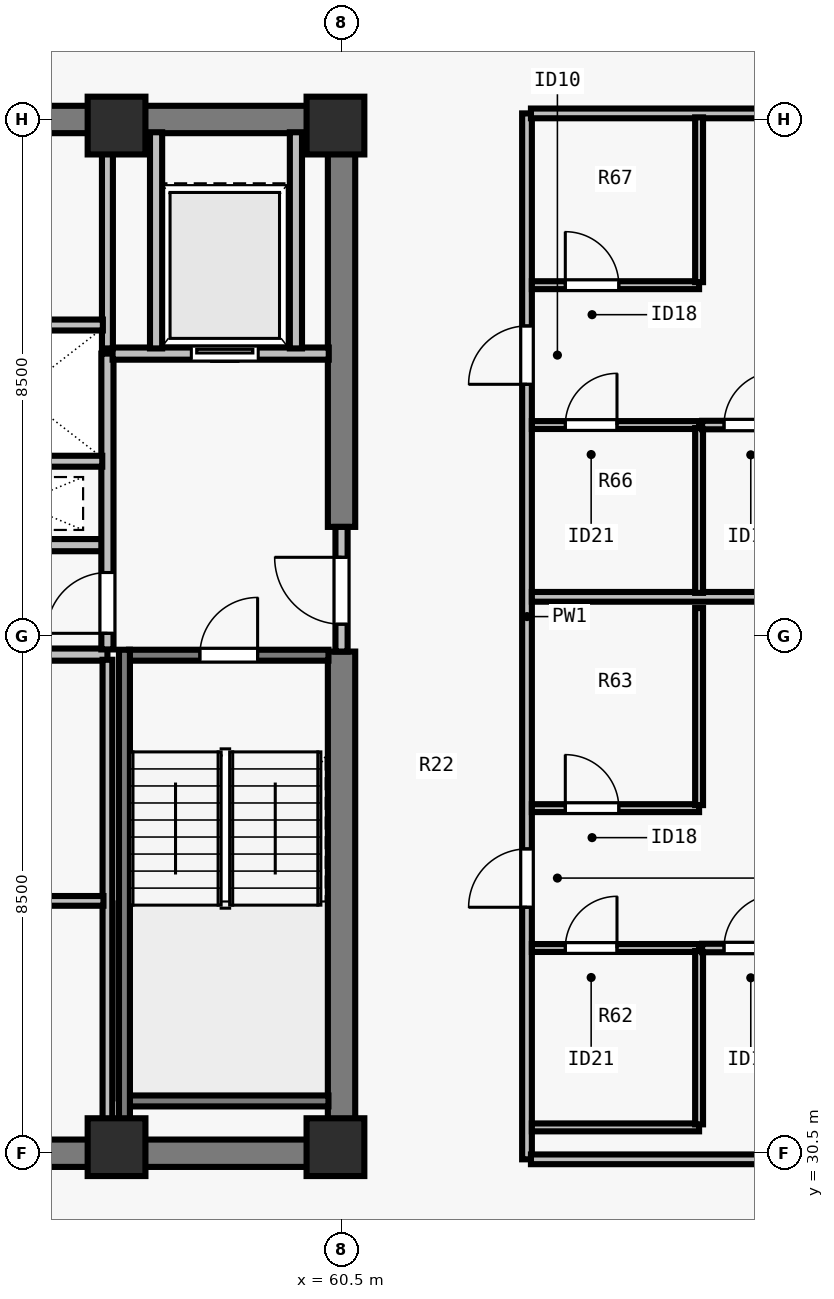
"""IFC4 building model, lengths in metres.
Left out: names, types, materials, properties, quantities, classifications, styles, units other than length and angle.
Written with IfcOpenShell. Run it as: python <this file> out.ifc"""

import sys

from ifc_helpers import new_model, si_unit, direction, frame, frame_2d, origin, origin_2d, place, context, subcontext, project, spatial, rectangle, extrude, element, fill, save


model = new_model("IFC4")
c1 = context("Model", 3, precision=1e-05, world=origin(), true_north=direction((0.0, 1.0)))
c2 = subcontext(c1, "Body", "Model", "MODEL_VIEW")
j1 = project(units=[si_unit("LENGTHUNIT", "METRE"), si_unit("PLANEANGLEUNIT", "RADIAN")], contexts=[c1])
p1 = place(None, origin())
s1 = spatial("IfcSite", under=j1, at=p1, CompositionType="ELEMENT")
p2 = place(p1, origin())
s2 = spatial("IfcBuilding", under=s1, at=p2, CompositionType="ELEMENT")
p3 = place(p2, frame((0.0, 0.0, 262.0)))
s3 = spatial("IfcBuildingStorey", under=s2, at=p3, CompositionType="ELEMENT", Elevation=262.0)
for number, where, z_axis, x_axis in (
    (1, (56.8, 30.6, 0.0), (0.0, 0.0, 1.0), (1.0, 0.0, 0.0)),
    (2, (60.4, 30.6, 0.0), (0.0, 0.0, 1.0), (1.0, 0.0, 0.0)),
    (3, (56.8, 47.4, 0.0), (0.0, 0.0, 1.0), (1.0, 0.0, 0.0)),
    (4, (60.4, 47.4, 0.0), (0.0, 0.0, 1.0), (1.0, 0.0, 0.0)),
):
    element("IfcColumn", number, at=place(p3, frame(where, z_axis=z_axis, x_axis=x_axis)), inside=s3, PredefinedType="COLUMN", context=c2, shape_type="SweptSolid", body=[
        extrude(rectangle(XDim=0.95, YDim=0.95, at=origin_2d()), origin(), (0.0, 0.0, 1.0), 3.5),
    ])
for number, where, z_axis, x_axis in (
    (5, (43.275, 30.5, 0.0), (0.0, 0.0, 1.0), (1.0, 0.0, 0.0)),
    (6, (43.275, 47.5, 0.0), (0.0, 0.0, 1.0), (1.0, 0.0, 0.0)),
):
    element("IfcWall", number, at=place(p3, frame(where, z_axis=z_axis, x_axis=x_axis)), inside=s3, PredefinedType="SHEAR", context=c2, shape_type="SweptSolid", body=[
        extrude(rectangle(XDim=17.45, YDim=0.45, at=frame_2d((8.725, 0.0))), origin(), (0.0, 0.0, 1.0), 3.29),
    ])
p4 = place(p3, frame((60.5, 30.715, 0.0), z_axis=(0.0, 0.0, 1.0), x_axis=(0.0, 1.0, 0.0)))
e7 = element("IfcWall", 7, at=p4, inside=s3, PredefinedType="SHEAR", context=c2, shape_type="SweptSolid", body=[
    extrude(rectangle(XDim=8.035, YDim=0.45, at=frame_2d((4.018, 0.0))), origin(), (0.0, 0.0, 1.0), 3.29),
])
p5 = place(p3, frame((60.5, 40.8, 0.0), z_axis=(0.0, 0.0, 1.0), x_axis=(0.0, 1.0, 0.0)))
e8 = element("IfcWall", 8, at=p5, inside=s3, PredefinedType="SHEAR", context=c2, shape_type="SweptSolid", body=[
    extrude(rectangle(XDim=6.485, YDim=0.45, at=frame_2d((3.242, 0.0))), origin(), (0.0, 0.0, 1.0), 3.29),
])
for number, where, z_axis, x_axis in (
    (9, (53.7, 38.7, 0.0), (0.0, 0.0, 1.0), (1.0, 0.0, 0.0)),
    (10, (53.7, 40.5, 0.0), (0.0, 0.0, 1.0), (1.0, 0.0, 0.0)),
):
    element("IfcWall", number, at=place(p3, frame(where, z_axis=z_axis, x_axis=x_axis)), inside=s3, PredefinedType="SOLIDWALL", context=c2, shape_type="SweptSolid", body=[
        extrude(rectangle(XDim=2.95, YDim=0.2, at=frame_2d((1.475, 0.0))), origin(), (0.0, 0.0, 1.0), 3.29),
    ])
p6 = place(p3, frame((60.5, 38.75, 0.0), z_axis=(0.0, 0.0, 1.0), x_axis=(0.0, 1.0, 0.0)))
e11 = element("IfcWall", 11, at=p6, inside=s3, PredefinedType="SOLIDWALL", context=c2, shape_type="SweptSolid", body=[
    extrude(rectangle(XDim=2.05, YDim=0.2, at=frame_2d((1.025, 0.0))), origin(), (0.0, 0.0, 1.0), 3.29),
])
p7 = place(p6, frame((0.45, 0.0, 0.0)))
e12 = element("IfcOpeningElement", 12, at=p7, cuts=e11, PredefinedType="OPENING", context=c2, shape_type="SweptSolid", body=[
    extrude(rectangle(XDim=1.1, YDim=2.15, at=frame_2d((0.55, 1.075))), frame((0.0, 0.11, 0.0), z_axis=(0.0, -1.0, 0.0), x_axis=(1.0, 0.0, 0.0)), (0.0, 0.0, 1.0), 0.22),
])
p8 = place(p3, frame((56.65, 38.785, 0.0), z_axis=(0.0, 0.0, 1.0), x_axis=(0.0, 1.0, 0.0)))
e13 = element("IfcWall", 13, at=p8, inside=s3, PredefinedType="SOLIDWALL", context=c2, shape_type="SweptSolid", body=[
    extrude(rectangle(XDim=4.865, YDim=0.2, at=frame_2d((2.433, 0.0))), origin(), (0.0, 0.0, 1.0), 3.29),
])
p9 = place(p8, frame((0.265, 0.0, 0.0)))
e14 = element("IfcOpeningElement", 14, at=p9, cuts=e13, PredefinedType="OPENING", context=c2, shape_type="SweptSolid", body=[
    extrude(rectangle(XDim=1.0, YDim=2.15, at=frame_2d((0.5, 1.075))), frame((0.0, 0.11, 0.0), z_axis=(0.0, -1.0, 0.0), x_axis=(1.0, 0.0, 0.0)), (0.0, 0.0, 1.0), 0.22),
])
p10 = place(p3, frame((56.735, 43.65, 0.0), z_axis=(0.0, 0.0, 1.0), x_axis=(1.0, 0.0, 0.0)))
e15 = element("IfcWall", 15, at=p10, inside=s3, PredefinedType="SOLIDWALL", context=c2, shape_type="SweptSolid", body=[
    extrude(rectangle(XDim=3.555, YDim=0.2, at=frame_2d((1.777, 0.0))), origin(), (0.0, 0.0, 1.0), 3.29),
])
p11 = place(p10, frame((1.295, 0.0, 0.0)))
e16 = element("IfcOpeningElement", 16, at=p11, cuts=e15, PredefinedType="OPENING", context=c2, shape_type="SweptSolid", body=[
    extrude(rectangle(XDim=1.1, YDim=2.2, at=frame_2d((0.55, 1.1))), frame((0.0, 0.11, 0.0), z_axis=(0.0, -1.0, 0.0), x_axis=(1.0, 0.0, 0.0)), (0.0, 0.0, 1.0), 0.22),
])
for number, where, z_axis, x_axis in (
    (17, (57.45, 43.735, 0.0), (0.0, 0.0, 1.0), (0.0, 1.0, 0.0)),
    (18, (59.75, 43.735, 0.0), (0.0, 0.0, 1.0), (0.0, 1.0, 0.0)),
):
    element("IfcWall", number, at=place(p3, frame(where, z_axis=z_axis, x_axis=x_axis)), inside=s3, PredefinedType="SOLIDWALL", context=c2, shape_type="SweptSolid", body=[
        extrude(rectangle(XDim=3.555, YDim=0.2, at=frame_2d((1.777, 0.0))), origin(), (0.0, 0.0, 1.0), 3.29),
    ])
p12 = place(p3, frame((56.65, 30.71, 0.0), z_axis=(0.0, 0.0, 1.0), x_axis=(0.0, 1.0, 0.0)))
e19 = element("IfcWall", 19, at=p12, inside=s3, PredefinedType="PARTITIONING", context=c2, shape_type="SweptSolid", body=[
    extrude(rectangle(XDim=7.905, YDim=0.16, at=frame_2d((3.953, 0.0))), origin(), (0.0, 0.0, 1.0), 3.29),
])
p13 = place(p3, frame((53.785, 34.65, 0.0), z_axis=(0.0, 0.0, 1.0), x_axis=(1.0, 0.0, 0.0)))
e20 = element("IfcWall", 20, at=p13, inside=s3, PredefinedType="PARTITIONING", context=c2, shape_type="SweptSolid", body=[
    extrude(rectangle(XDim=2.8, YDim=0.16, at=frame_2d((1.4, 0.0))), origin(), (0.0, 0.0, 1.0), 3.29),
])
p14 = place(p3, frame((56.65, 43.735, 0.0), z_axis=(0.0, 0.0, 1.0), x_axis=(0.0, 1.0, 0.0)))
e21 = element("IfcWall", 21, at=p14, inside=s3, PredefinedType="SOLIDWALL", context=c2, shape_type="SweptSolid", body=[
    extrude(rectangle(XDim=3.555, YDim=0.18, at=frame_2d((1.777, 0.0))), origin(), (0.0, 0.0, 1.0), 3.29),
])
p15 = place(p3, frame((53.785, 41.88, 0.0), z_axis=(0.0, 0.0, 1.0), x_axis=(1.0, 0.0, 0.0)))
e22 = element("IfcWall", 22, at=p15, inside=s3, PredefinedType="SOLIDWALL", context=c2, shape_type="SweptSolid", body=[
    extrude(rectangle(XDim=2.78, YDim=0.18, at=frame_2d((1.39, 0.0))), origin(), (0.0, 0.0, 1.0), 3.29),
])
p16 = place(p3, frame((53.785, 44.12, 0.0), z_axis=(0.0, 0.0, 1.0), x_axis=(1.0, 0.0, 0.0)))
e23 = element("IfcWall", 23, at=p16, inside=s3, PredefinedType="SOLIDWALL", context=c2, shape_type="SweptSolid", body=[
    extrude(rectangle(XDim=2.79, YDim=0.18, at=frame_2d((1.395, 0.0))), origin(), (0.0, 0.0, 1.0), 3.29),
])
p17 = place(p3, frame((63.55, 30.4, 0.0), z_axis=(0.0, 0.0, 1.0), x_axis=(0.0, 1.0, 0.0)))
e24 = element("IfcWall", 24, at=p17, inside=s3, PredefinedType="PARTITIONING", context=c2, shape_type="SweptSolid", body=[
    extrude(rectangle(XDim=17.2, YDim=0.16, at=frame_2d((8.6, 0.0))), origin(), (0.0, 0.0, 1.0), 3.29),
])
p18 = place(p17, frame((4.145, 0.0, 0.0)))
e25 = element("IfcOpeningElement", 25, at=p18, cuts=e24, PredefinedType="OPENING", context=c2, shape_type="SweptSolid", body=[
    extrude(rectangle(XDim=0.96, YDim=2.18, at=frame_2d((0.48, 1.09))), frame((0.0, 0.09, 0.0), z_axis=(0.0, -1.0, 0.0), x_axis=(1.0, 0.0, 0.0)), (0.0, 0.0, 1.0), 0.18),
])
p19 = place(p17, frame((12.745, 0.0, 0.0)))
e26 = element("IfcOpeningElement", 26, at=p19, cuts=e24, PredefinedType="OPENING", context=c2, shape_type="SweptSolid", body=[
    extrude(rectangle(XDim=0.96, YDim=2.18, at=frame_2d((0.48, 1.09))), frame((0.0, 0.09, 0.0), z_axis=(0.0, -1.0, 0.0), x_axis=(1.0, 0.0, 0.0)), (0.0, 0.0, 1.0), 0.18),
])
for number, where, z_axis, x_axis in (
    (27, (63.615, 30.4, 0.0), (0.0, 0.0, 1.0), (1.0, 0.0, 0.0)),
    (28, (63.615, 47.6, 0.0), (0.0, 0.0, 1.0), (1.0, 0.0, 0.0)),
):
    element("IfcWall", number, at=place(p3, frame(where, z_axis=z_axis, x_axis=x_axis)), inside=s3, PredefinedType="PARTITIONING", context=c2, shape_type="SweptSolid", body=[
        extrude(rectangle(XDim=10.58, YDim=0.16, at=frame_2d((5.29, 0.0))), origin(), (0.0, 0.0, 1.0), 3.29),
    ])
p20 = place(p3, frame((63.63, 39.65, 0.0), z_axis=(0.0, 0.0, 1.0), x_axis=(1.0, 0.0, 0.0)))
e29 = element("IfcWall", 29, at=p20, inside=s3, PredefinedType="PARTITIONING", context=c2, shape_type="SweptSolid", body=[
    extrude(rectangle(XDim=10.565, YDim=0.16, at=frame_2d((5.283, 0.0))), origin(), (0.0, 0.0, 1.0), 3.29),
])
p21 = place(p3, frame((63.63, 30.925, 0.0), z_axis=(0.0, 0.0, 1.0), x_axis=(1.0, 0.0, 0.0)))
e30 = element("IfcWall", 30, at=p21, inside=s3, PredefinedType="PLUMBINGWALL", context=c2, shape_type="SweptSolid", body=[
    extrude(rectangle(XDim=2.75, YDim=0.13, at=frame_2d((1.375, 0.0))), origin(), (0.0, 0.0, 1.0), 3.29),
])
p22 = place(p3, frame((63.63, 33.875, 0.0), z_axis=(0.0, 0.0, 1.0), x_axis=(1.0, 0.0, 0.0)))
e31 = element("IfcWall", 31, at=p22, inside=s3, PredefinedType="PLUMBINGWALL", context=c2, shape_type="SweptSolid", body=[
    extrude(rectangle(XDim=2.75, YDim=0.13, at=frame_2d((1.375, 0.0))), origin(), (0.0, 0.0, 1.0), 3.29),
])
p23 = place(p22, frame((0.55, 0.0, 0.0)))
e32 = element("IfcOpeningElement", 32, at=p23, cuts=e31, PredefinedType="OPENING", context=c2, shape_type="SweptSolid", body=[
    extrude(rectangle(XDim=0.85, YDim=2.08, at=frame_2d((0.425, 1.04))), frame((0.0, 0.075, 0.0), z_axis=(0.0, -1.0, 0.0), x_axis=(1.0, 0.0, 0.0)), (0.0, 0.0, 1.0), 0.15),
])
p24 = place(p3, frame((66.38, 30.975, 0.0), z_axis=(0.0, 0.0, 1.0), x_axis=(0.0, 1.0, 0.0)))
e33 = element("IfcWall", 33, at=p24, inside=s3, PredefinedType="PLUMBINGWALL", context=c2, shape_type="SweptSolid", body=[
    extrude(rectangle(XDim=2.85, YDim=0.13, at=frame_2d((1.425, 0.0))), origin(), (0.0, 0.0, 1.0), 3.29),
])
p25 = place(p3, frame((63.63, 36.175, 0.0), z_axis=(0.0, 0.0, 1.0), x_axis=(1.0, 0.0, 0.0)))
e34 = element("IfcWall", 34, at=p25, inside=s3, PredefinedType="PLUMBINGWALL", context=c2, shape_type="SweptSolid", body=[
    extrude(rectangle(XDim=2.75, YDim=0.13, at=frame_2d((1.375, 0.0))), origin(), (0.0, 0.0, 1.0), 3.29),
])
p26 = place(p25, frame((0.55, 0.0, 0.0)))
e35 = element("IfcOpeningElement", 35, at=p26, cuts=e34, PredefinedType="OPENING", context=c2, shape_type="SweptSolid", body=[
    extrude(rectangle(XDim=0.88, YDim=2.1, at=frame_2d((0.44, 1.05))), frame((0.0, 0.075, 0.0), z_axis=(0.0, -1.0, 0.0), x_axis=(1.0, 0.0, 0.0)), (0.0, 0.0, 1.0), 0.15),
])
p27 = place(p3, frame((66.38, 36.225, 0.0), z_axis=(0.0, 0.0, 1.0), x_axis=(0.0, 1.0, 0.0)))
e36 = element("IfcWall", 36, at=p27, inside=s3, PredefinedType="PLUMBINGWALL", context=c2, shape_type="SweptSolid", body=[
    extrude(rectangle(XDim=3.24, YDim=0.13, at=frame_2d((1.62, 0.0))), origin(), (0.0, 0.0, 1.0), 3.29),
])
p28 = place(p3, frame((66.43, 33.875, 0.0), z_axis=(0.0, 0.0, 1.0), x_axis=(1.0, 0.0, 0.0)))
e37 = element("IfcWall", 37, at=p28, inside=s3, PredefinedType="PARTITIONING", context=c2, shape_type="SweptSolid", body=[
    extrude(rectangle(XDim=7.69, YDim=0.14, at=frame_2d((3.845, 0.0))), origin(), (0.0, 0.0, 1.0), 2.573),
])
p29 = place(p28, frame((0.36, 0.0, 0.0)))
e38 = element("IfcOpeningElement", 38, at=p29, cuts=e37, PredefinedType="OPENING", context=c2, shape_type="SweptSolid", body=[
    extrude(rectangle(XDim=0.88, YDim=2.1, at=frame_2d((0.44, 1.05))), frame((0.0, 0.08, 0.0), z_axis=(0.0, -1.0, 0.0), x_axis=(1.0, 0.0, 0.0)), (0.0, 0.0, 1.0), 0.16),
])
p30 = place(p3, frame((63.63, 42.475, 0.0), z_axis=(0.0, 0.0, 1.0), x_axis=(1.0, 0.0, 0.0)))
e39 = element("IfcWall", 39, at=p30, inside=s3, PredefinedType="PLUMBINGWALL", context=c2, shape_type="SweptSolid", body=[
    extrude(rectangle(XDim=2.75, YDim=0.13, at=frame_2d((1.375, 0.0))), origin(), (0.0, 0.0, 1.0), 3.29),
])
p31 = place(p30, frame((0.55, 0.0, 0.0)))
e40 = element("IfcOpeningElement", 40, at=p31, cuts=e39, PredefinedType="OPENING", context=c2, shape_type="SweptSolid", body=[
    extrude(rectangle(XDim=0.85, YDim=2.08, at=frame_2d((0.425, 1.04))), frame((0.0, 0.075, 0.0), z_axis=(0.0, -1.0, 0.0), x_axis=(1.0, 0.0, 0.0)), (0.0, 0.0, 1.0), 0.15),
])
p32 = place(p3, frame((66.38, 39.715, 0.0), z_axis=(0.0, 0.0, 1.0), x_axis=(0.0, 1.0, 0.0)))
e41 = element("IfcWall", 41, at=p32, inside=s3, PredefinedType="PLUMBINGWALL", context=c2, shape_type="SweptSolid", body=[
    extrude(rectangle(XDim=2.71, YDim=0.13, at=frame_2d((1.355, 0.0))), origin(), (0.0, 0.0, 1.0), 3.29),
])
p33 = place(p3, frame((63.63, 44.775, 0.0), z_axis=(0.0, 0.0, 1.0), x_axis=(1.0, 0.0, 0.0)))
e42 = element("IfcWall", 42, at=p33, inside=s3, PredefinedType="PLUMBINGWALL", context=c2, shape_type="SweptSolid", body=[
    extrude(rectangle(XDim=2.75, YDim=0.13, at=frame_2d((1.375, 0.0))), origin(), (0.0, 0.0, 1.0), 3.29),
])
p34 = place(p33, frame((0.55, 0.0, 0.0)))
e43 = element("IfcOpeningElement", 43, at=p34, cuts=e42, PredefinedType="OPENING", context=c2, shape_type="SweptSolid", body=[
    extrude(rectangle(XDim=0.88, YDim=2.1, at=frame_2d((0.44, 1.05))), frame((0.0, 0.075, 0.0), z_axis=(0.0, -1.0, 0.0), x_axis=(1.0, 0.0, 0.0)), (0.0, 0.0, 1.0), 0.15),
])
p35 = place(p3, frame((66.38, 44.825, 0.0), z_axis=(0.0, 0.0, 1.0), x_axis=(0.0, 1.0, 0.0)))
e44 = element("IfcWall", 44, at=p35, inside=s3, PredefinedType="PLUMBINGWALL", context=c2, shape_type="SweptSolid", body=[
    extrude(rectangle(XDim=2.71, YDim=0.13, at=frame_2d((1.355, 0.0))), origin(), (0.0, 0.0, 1.0), 3.29),
])
p36 = place(p3, frame((66.43, 42.475, 0.0), z_axis=(0.0, 0.0, 1.0), x_axis=(1.0, 0.0, 0.0)))
e45 = element("IfcWall", 45, at=p36, inside=s3, PredefinedType="PARTITIONING", context=c2, shape_type="SweptSolid", body=[
    extrude(rectangle(XDim=7.69, YDim=0.14, at=frame_2d((3.845, 0.0))), origin(), (0.0, 0.0, 1.0), 3.29),
])
p37 = place(p36, frame((0.36, 0.0, 0.0)))
e46 = element("IfcOpeningElement", 46, at=p37, cuts=e45, PredefinedType="OPENING", context=c2, shape_type="SweptSolid", body=[
    extrude(rectangle(XDim=0.88, YDim=2.1, at=frame_2d((0.44, 1.05))), frame((0.0, 0.08, 0.0), z_axis=(0.0, -1.0, 0.0), x_axis=(1.0, 0.0, 0.0)), (0.0, 0.0, 1.0), 0.16),
])
p38 = place(p3, frame((57.005, 38.69, 0.0), z_axis=(0.0, 0.0, 1.0), x_axis=(1.0, 0.0, 0.0)))
e47 = element("IfcWall", 47, at=p38, inside=s3, PredefinedType="SOLIDWALL", context=c2, shape_type="SweptSolid", body=[
    extrude(rectangle(XDim=3.28, YDim=0.18, at=frame_2d((1.64, 0.0))), origin(), (0.0, 0.0, 1.0), 3.29),
])
p39 = place(p38, frame((1.165, 0.0, 0.0)))
e48 = element("IfcOpeningElement", 48, at=p39, cuts=e47, PredefinedType="OPENING", context=c2, shape_type="SweptSolid", body=[
    extrude(rectangle(XDim=0.95, YDim=2.15, at=frame_2d((0.475, 1.075))), frame((0.0, 0.1, 0.0), z_axis=(0.0, -1.0, 0.0), x_axis=(1.0, 0.0, 0.0)), (0.0, 0.0, 1.0), 0.2),
])
p40 = place(p3, frame((57.005, 31.36, 0.0), z_axis=(0.0, 0.0, 1.0), x_axis=(1.0, 0.0, 0.0)))
e49 = element("IfcWall", 49, at=p40, inside=s3, PredefinedType="SOLIDWALL", context=c2, shape_type="SweptSolid", body=[
    extrude(rectangle(XDim=3.28, YDim=0.18, at=frame_2d((1.64, 0.0))), origin(), (0.0, 0.0, 1.0), 3.29),
])
p41 = place(p3, frame((56.93, 38.78, 0.0), z_axis=(0.0, 0.0, 1.0), x_axis=(0.0, -1.0, 0.0)))
e50 = element("IfcWall", 50, at=p41, inside=s3, PredefinedType="SOLIDWALL", context=c2, shape_type="SweptSolid", body=[
    extrude(rectangle(XDim=8.067, YDim=0.18, at=frame_2d((4.034, 0.0))), origin(), (0.0, 0.0, 1.0), 3.29),
])
p42 = place(p7, origin())
e51 = element("IfcDoor", 51, at=p42, inside=s3, OperationType="SINGLE_SWING_RIGHT", PredefinedType="DOOR", context=c2, shape_type="SweptSolid", body=[
    extrude(rectangle(XDim=1.1, YDim=2.15, at=frame_2d((0.55, 1.075))), frame((0.0, 0.025, 0.0), z_axis=(0.0, -1.0, 0.0), x_axis=(1.0, 0.0, 0.0)), (0.0, 0.0, 1.0), 0.05),
])
fill(e12, e51)
p43 = place(p9, origin())
e52 = element("IfcDoor", 52, at=p43, inside=s3, OperationType="SINGLE_SWING_LEFT", PredefinedType="DOOR", context=c2, shape_type="SweptSolid", body=[
    extrude(rectangle(XDim=1.0, YDim=2.15, at=frame_2d((0.5, 1.075))), frame((0.0, 0.025, 0.0), z_axis=(0.0, -1.0, 0.0), x_axis=(1.0, 0.0, 0.0)), (0.0, 0.0, 1.0), 0.05),
])
fill(e14, e52)
p44 = place(p11, origin())
e53 = element("IfcDoor", 53, at=p44, inside=s3, OperationType="SLIDING_TO_LEFT", PredefinedType="DOOR", context=c2, shape_type="SweptSolid", body=[
    extrude(rectangle(XDim=1.1, YDim=2.2, at=frame_2d((0.55, 1.1))), frame((0.0, 0.025, 0.0), z_axis=(0.0, -1.0, 0.0), x_axis=(1.0, 0.0, 0.0)), (0.0, 0.0, 1.0), 0.05),
])
fill(e16, e53)
p45 = place(p23, origin())
e54 = element("IfcDoor", 54, at=p45, inside=s3, OperationType="SINGLE_SWING_RIGHT", PredefinedType="DOOR", context=c2, shape_type="SweptSolid", body=[
    extrude(rectangle(XDim=0.85, YDim=2.08, at=frame_2d((0.425, 1.04))), frame((0.0, 0.025, 0.0), z_axis=(0.0, -1.0, 0.0), x_axis=(1.0, 0.0, 0.0)), (0.0, 0.0, 1.0), 0.05),
])
fill(e32, e54)
p46 = place(p26, origin())
e55 = element("IfcDoor", 55, at=p46, inside=s3, OperationType="SINGLE_SWING_LEFT", PredefinedType="DOOR", context=c2, shape_type="SweptSolid", body=[
    extrude(rectangle(XDim=0.88, YDim=2.1, at=frame_2d((0.44, 1.05))), frame((0.0, 0.025, 0.0), z_axis=(0.0, -1.0, 0.0), x_axis=(1.0, 0.0, 0.0)), (0.0, 0.0, 1.0), 0.05),
])
fill(e35, e55)
p47 = place(p29, origin())
e56 = element("IfcDoor", 56, at=p47, inside=s3, OperationType="SINGLE_SWING_RIGHT", PredefinedType="DOOR", context=c2, shape_type="SweptSolid", body=[
    extrude(rectangle(XDim=0.88, YDim=2.1, at=frame_2d((0.44, 1.05))), frame((0.0, 0.025, 0.0), z_axis=(0.0, -1.0, 0.0), x_axis=(1.0, 0.0, 0.0)), (0.0, 0.0, 1.0), 0.05),
])
fill(e38, e56)
p48 = place(p18, origin())
e57 = element("IfcDoor", 57, at=p48, inside=s3, OperationType="SINGLE_SWING_LEFT", PredefinedType="DOOR", context=c2, shape_type="SweptSolid", body=[
    extrude(rectangle(XDim=0.96, YDim=2.18, at=frame_2d((0.48, 1.09))), frame((0.0, 0.025, 0.0), z_axis=(0.0, -1.0, 0.0), x_axis=(1.0, 0.0, 0.0)), (0.0, 0.0, 1.0), 0.05),
])
fill(e25, e57)
p49 = place(p31, origin())
e58 = element("IfcDoor", 58, at=p49, inside=s3, OperationType="SINGLE_SWING_RIGHT", PredefinedType="DOOR", context=c2, shape_type="SweptSolid", body=[
    extrude(rectangle(XDim=0.85, YDim=2.08, at=frame_2d((0.425, 1.04))), frame((0.0, 0.025, 0.0), z_axis=(0.0, -1.0, 0.0), x_axis=(1.0, 0.0, 0.0)), (0.0, 0.0, 1.0), 0.05),
])
fill(e40, e58)
p50 = place(p34, origin())
e59 = element("IfcDoor", 59, at=p50, inside=s3, OperationType="SINGLE_SWING_LEFT", PredefinedType="DOOR", context=c2, shape_type="SweptSolid", body=[
    extrude(rectangle(XDim=0.88, YDim=2.1, at=frame_2d((0.44, 1.05))), frame((0.0, 0.025, 0.0), z_axis=(0.0, -1.0, 0.0), x_axis=(1.0, 0.0, 0.0)), (0.0, 0.0, 1.0), 0.05),
])
fill(e43, e59)
p51 = place(p37, origin())
e60 = element("IfcDoor", 60, at=p51, inside=s3, OperationType="SINGLE_SWING_RIGHT", PredefinedType="DOOR", context=c2, shape_type="SweptSolid", body=[
    extrude(rectangle(XDim=0.88, YDim=2.1, at=frame_2d((0.44, 1.05))), frame((0.0, 0.025, 0.0), z_axis=(0.0, -1.0, 0.0), x_axis=(1.0, 0.0, 0.0)), (0.0, 0.0, 1.0), 0.05),
])
fill(e46, e60)
p52 = place(p19, origin())
e61 = element("IfcDoor", 61, at=p52, inside=s3, OperationType="SINGLE_SWING_LEFT", PredefinedType="DOOR", context=c2, shape_type="SweptSolid", body=[
    extrude(rectangle(XDim=0.96, YDim=2.18, at=frame_2d((0.48, 1.09))), frame((0.0, 0.025, 0.0), z_axis=(0.0, -1.0, 0.0), x_axis=(1.0, 0.0, 0.0)), (0.0, 0.0, 1.0), 0.05),
])
fill(e26, e61)
p53 = place(p39, origin())
e62 = element("IfcDoor", 62, at=p53, inside=s3, OperationType="SINGLE_SWING_RIGHT", PredefinedType="DOOR", context=c2, shape_type="SweptSolid", body=[
    extrude(rectangle(XDim=0.95, YDim=2.15, at=frame_2d((0.475, 1.075))), frame((0.0, 0.025, 0.0), z_axis=(0.0, -1.0, 0.0), x_axis=(1.0, 0.0, 0.0)), (0.0, 0.0, 1.0), 0.05),
])
fill(e48, e62)
save(model, sys.argv[1])
